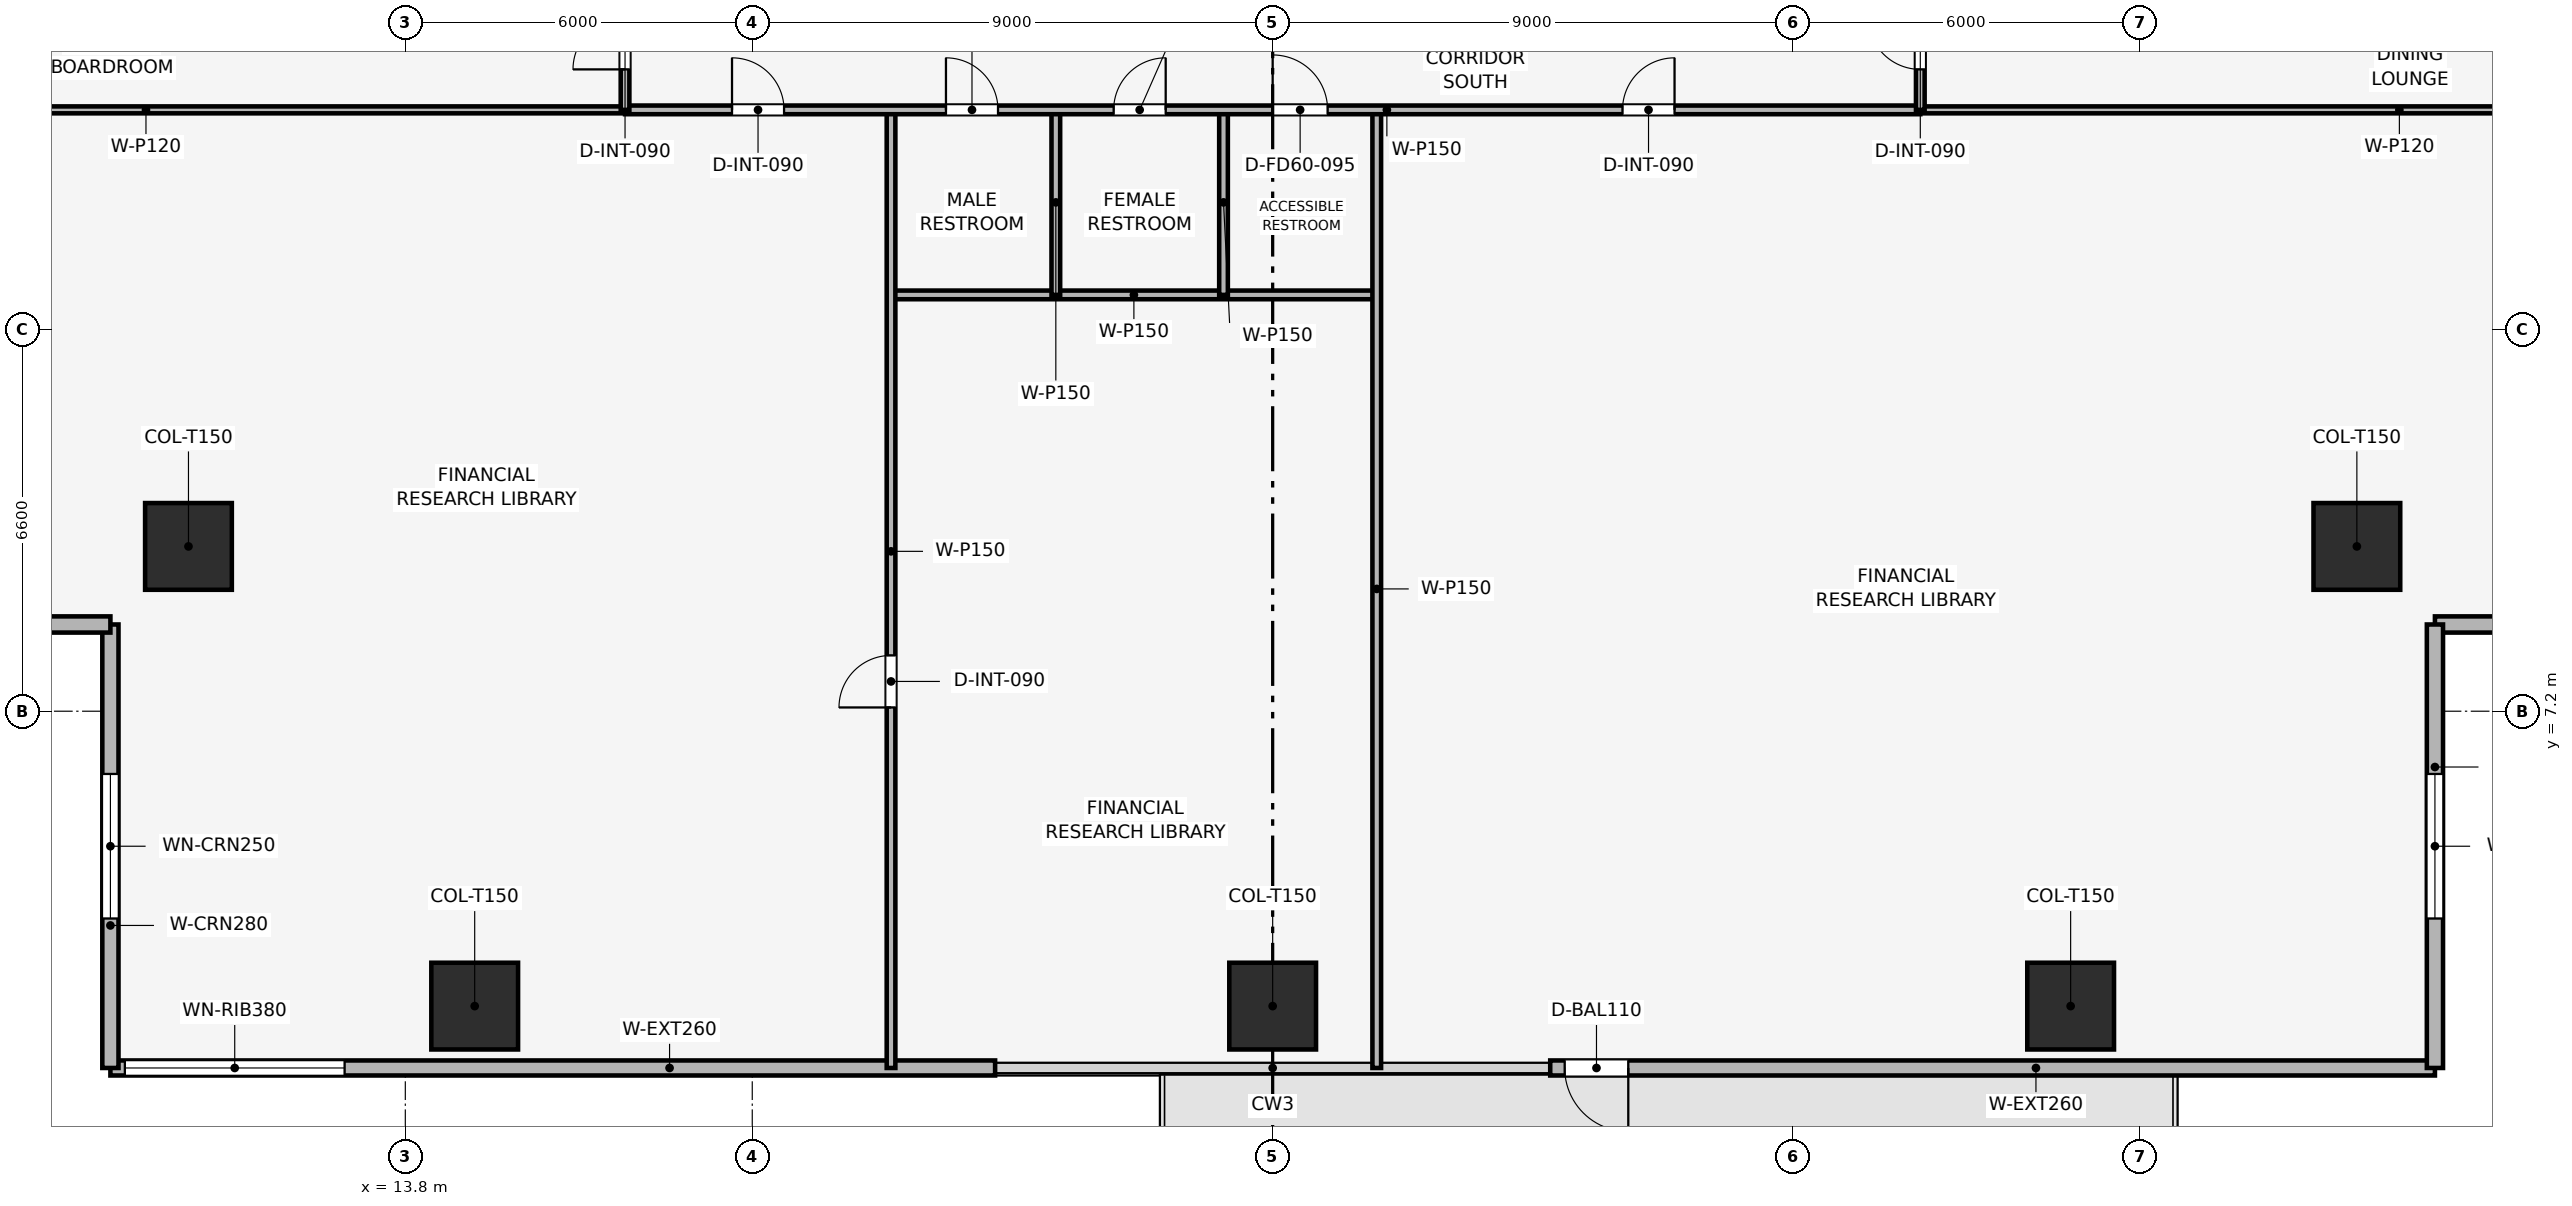
"""IFC4 building model, lengths in metres.
Left out: names, types, materials, properties, quantities, classifications, styles, units other than length and angle.
Written with IfcOpenShell. Run it as: python <this file> out.ifc"""

import sys

from ifc_helpers import new_model, si_unit, direction, frame, frame_2d, origin, origin_2d, place, context, subcontext, project, spatial, rectangle, extrude, element, fill, save


model = new_model("IFC4")
c1 = context("Model", 3, precision=1e-05, world=origin(), true_north=direction((0.0, 1.0)))
c2 = subcontext(c1, "Body", "Model", "MODEL_VIEW")
j1 = project(units=[si_unit("LENGTHUNIT", "METRE"), si_unit("PLANEANGLEUNIT", "RADIAN")], contexts=[c1])
p1 = place(None, origin())
s1 = spatial("IfcSite", under=j1, at=p1, CompositionType="ELEMENT")
p2 = place(p1, origin())
s2 = spatial("IfcBuilding", under=s1, at=p2, CompositionType="ELEMENT")
p3 = place(p2, frame((0.0, 0.0, 92.4)))
s3 = spatial("IfcBuildingStorey", under=s2, at=p3, CompositionType="ELEMENT", Elevation=92.4)
for number, where, z_axis, x_axis in (
    (1, (15.0, 2.1, 0.003), (0.0, 0.0, 1.0), (1.0, 0.0, 0.0)),
    (2, (28.8, 2.1, 0.003), (0.0, 0.0, 1.0), (1.0, 0.0, 0.0)),
    (3, (42.6, 2.1, 0.003), (0.0, 0.0, 1.0), (1.0, 0.0, 0.0)),
    (4, (10.05, 10.05, 0.003), (0.0, 0.0, 1.0), (1.0, 0.0, 0.0)),
    (5, (47.55, 10.05, 0.003), (0.0, 0.0, 1.0), (1.0, 0.0, 0.0)),
):
    element("IfcColumn", number, at=place(p3, frame(where, z_axis=z_axis, x_axis=x_axis)), inside=s3, PredefinedType="COLUMN", context=c2, shape_type="SweptSolid", body=[
        extrude(rectangle(XDim=1.5, YDim=1.5, at=origin_2d()), origin(), (0.0, 0.0, 1.0), 3.644),
    ])
p4 = place(p3, frame((48.9, 1.03, 0.0), z_axis=(0.0, 0.0, 1.0), x_axis=(-1.0, 0.0, 0.0)))
e6 = element("IfcWall", 6, at=p4, inside=s3, PredefinedType="SOLIDWALL", context=c2, shape_type="SweptSolid", body=[
    extrude(rectangle(XDim=15.3, YDim=0.26, at=frame_2d((7.65, 0.0))), origin(), (0.0, 0.0, 1.0), 3.65),
])
p5 = place(p4, frame((13.95, 0.0, 0.0)))
e7 = element("IfcOpeningElement", 7, at=p5, cuts=e6, PredefinedType="OPENING", context=c2, shape_type="SweptSolid", body=[
    extrude(rectangle(XDim=1.1, YDim=2.2, at=frame_2d((0.55, 1.1))), frame((0.0, 0.14, 0.0), z_axis=(0.0, -1.0, 0.0), x_axis=(1.0, 0.0, 0.0)), (0.0, 0.0, 1.0), 0.28),
])
p6 = place(p3, frame((24.0, 1.03, 0.0), z_axis=(0.0, 0.0, 1.0), x_axis=(-1.0, 0.0, 0.0)))
e8 = element("IfcWall", 8, at=p6, inside=s3, PredefinedType="SOLIDWALL", context=c2, shape_type="SweptSolid", body=[
    extrude(rectangle(XDim=15.3, YDim=0.26, at=frame_2d((7.65, 0.0))), origin(), (0.0, 0.0, 1.0), 3.65),
])
p7 = place(p6, frame((11.25, 0.0, 0.9)))
e9 = element("IfcOpeningElement", 9, at=p7, cuts=e8, PredefinedType="OPENING", context=c2, shape_type="SweptSolid", body=[
    extrude(rectangle(XDim=3.8, YDim=1.9, at=frame_2d((1.9, 0.95))), frame((0.0, 0.14, 0.0), z_axis=(0.0, -1.0, 0.0), x_axis=(1.0, 0.0, 0.0)), (0.0, 0.0, 1.0), 0.28),
])
p8 = place(p3, frame((8.7, 1.03, 0.0), z_axis=(0.0, 0.0, 1.0), x_axis=(0.0, 1.0, 0.0)))
e10 = element("IfcWall", 10, at=p8, inside=s3, PredefinedType="SOLIDWALL", context=c2, shape_type="SweptSolid", body=[
    extrude(rectangle(XDim=7.67, YDim=0.28, at=frame_2d((3.835, 0.0))), origin(), (0.0, 0.0, 1.0), 3.65),
])
p9 = place(p8, frame((2.585, 0.0, 0.9)))
e11 = element("IfcOpeningElement", 11, at=p9, cuts=e10, PredefinedType="OPENING", context=c2, shape_type="SweptSolid", body=[
    extrude(rectangle(XDim=2.5, YDim=1.9, at=frame_2d((1.25, 0.95))), frame((0.0, 0.15, 0.0), z_axis=(0.0, -1.0, 0.0), x_axis=(1.0, 0.0, 0.0)), (0.0, 0.0, 1.0), 0.3),
])
p10 = place(p3, frame((8.7, 8.7, 0.0), z_axis=(0.0, 0.0, 1.0), x_axis=(-1.0, 0.0, 0.0)))
e12 = element("IfcWall", 12, at=p10, inside=s3, PredefinedType="SOLIDWALL", context=c2, shape_type="SweptSolid", body=[
    extrude(rectangle(XDim=7.67, YDim=0.28, at=frame_2d((3.835, 0.0))), origin(), (0.0, 0.0, 1.0), 3.65),
])
p11 = place(p10, frame((2.585, 0.0, 0.9)))
e13 = element("IfcOpeningElement", 13, at=p11, cuts=e12, PredefinedType="OPENING", context=c2, shape_type="SweptSolid", body=[
    extrude(rectangle(XDim=2.5, YDim=1.9, at=frame_2d((1.25, 0.95))), frame((0.0, 0.15, 0.0), z_axis=(0.0, -1.0, 0.0), x_axis=(1.0, 0.0, 0.0)), (0.0, 0.0, 1.0), 0.3),
])
p12 = place(p3, frame((56.57, 8.7, 0.0), z_axis=(0.0, 0.0, 1.0), x_axis=(-1.0, 0.0, 0.0)))
e14 = element("IfcWall", 14, at=p12, inside=s3, PredefinedType="SOLIDWALL", context=c2, shape_type="SweptSolid", body=[
    extrude(rectangle(XDim=7.67, YDim=0.28, at=frame_2d((3.835, 0.0))), origin(), (0.0, 0.0, 1.0), 3.65),
])
p13 = place(p12, frame((2.585, 0.0, 0.9)))
e15 = element("IfcOpeningElement", 15, at=p13, cuts=e14, PredefinedType="OPENING", context=c2, shape_type="SweptSolid", body=[
    extrude(rectangle(XDim=2.5, YDim=1.9, at=frame_2d((1.25, 0.95))), frame((0.0, 0.15, 0.0), z_axis=(0.0, -1.0, 0.0), x_axis=(1.0, 0.0, 0.0)), (0.0, 0.0, 1.0), 0.3),
])
p14 = place(p3, frame((48.9, 8.7, 0.0), z_axis=(0.0, 0.0, 1.0), x_axis=(0.0, -1.0, 0.0)))
e16 = element("IfcWall", 16, at=p14, inside=s3, PredefinedType="SOLIDWALL", context=c2, shape_type="SweptSolid", body=[
    extrude(rectangle(XDim=7.67, YDim=0.28, at=frame_2d((3.835, 0.0))), origin(), (0.0, 0.0, 1.0), 3.65),
])
p15 = place(p14, frame((2.585, 0.0, 0.9)))
e17 = element("IfcOpeningElement", 17, at=p15, cuts=e16, PredefinedType="OPENING", context=c2, shape_type="SweptSolid", body=[
    extrude(rectangle(XDim=2.5, YDim=1.9, at=frame_2d((1.25, 0.95))), frame((0.0, 0.15, 0.0), z_axis=(0.0, -1.0, 0.0), x_axis=(1.0, 0.0, 0.0)), (0.0, 0.0, 1.0), 0.3),
])
p16 = place(p3, frame((22.2, 14.4, 0.0), z_axis=(0.0, 0.0, 1.0), x_axis=(1.0, 0.0, 0.0)))
e18 = element("IfcWall", 18, at=p16, inside=s3, PredefinedType="PARTITIONING", context=c2, shape_type="SweptSolid", body=[
    extrude(rectangle(XDim=8.4, YDim=0.15, at=frame_2d((4.2, 0.0))), origin(), (0.0, 0.0, 1.0), 3.085),
])
p17 = place(p3, frame((22.2, 1.03, 0.0), z_axis=(0.0, 0.0, 1.0), x_axis=(0.0, 1.0, 0.0)))
e19 = element("IfcWall", 19, at=p17, inside=s3, PredefinedType="PARTITIONING", context=c2, shape_type="SweptSolid", body=[
    extrude(rectangle(XDim=16.57, YDim=0.15, at=frame_2d((8.285, 0.0))), origin(), (0.0, 0.0, 1.0), 2.935),
])
p18 = place(p17, frame((6.235, 0.0, 0.0)))
e20 = element("IfcOpeningElement", 20, at=p18, cuts=e19, PredefinedType="OPENING", context=c2, shape_type="SweptSolid", body=[
    extrude(rectangle(XDim=0.9, YDim=2.1, at=frame_2d((0.45, 1.05))), frame((0.0, 0.085, 0.0), z_axis=(0.0, -1.0, 0.0), x_axis=(1.0, 0.0, 0.0)), (0.0, 0.0, 1.0), 0.17),
])
p19 = place(p3, frame((30.6, 1.03, 0.0), z_axis=(0.0, 0.0, 1.0), x_axis=(0.0, 1.0, 0.0)))
e21 = element("IfcWall", 21, at=p19, inside=s3, PredefinedType="PARTITIONING", context=c2, shape_type="SweptSolid", body=[
    extrude(rectangle(XDim=16.57, YDim=0.15, at=frame_2d((8.285, 0.0))), origin(), (0.0, 0.0, 1.0), 2.935),
])
for number, where, z_axis, x_axis in (
    (22, (25.05, 14.4, 0.0), (0.0, 0.0, 1.0), (0.0, 1.0, 0.0)),
    (23, (27.95, 14.4, 0.0), (0.0, 0.0, 1.0), (0.0, 1.0, 0.0)),
):
    element("IfcWall", number, at=place(p3, frame(where, z_axis=z_axis, x_axis=x_axis)), inside=s3, PredefinedType="PARTITIONING", context=c2, shape_type="SweptSolid", body=[
        extrude(rectangle(XDim=3.2, YDim=0.15, at=frame_2d((1.6, 0.0))), origin(), (0.0, 0.0, 1.0), 3.65),
    ])
for number, where, z_axis, x_axis in (
    (24, (1.03, 17.6, 0.0), (0.0, 0.0, 1.0), (1.0, 0.0, 0.0)),
    (25, (40.0, 17.6, 0.0), (0.0, 0.0, 1.0), (1.0, 0.0, 0.0)),
):
    element("IfcWall", number, at=place(p3, frame(where, z_axis=z_axis, x_axis=x_axis)), inside=s3, PredefinedType="PARTITIONING", context=c2, shape_type="SweptSolid", body=[
        extrude(rectangle(XDim=16.57, YDim=0.12, at=frame_2d((8.285, 0.0))), origin(), (0.0, 0.0, 1.0), 2.935),
    ])
p20 = place(p3, frame((17.6, 17.6, 0.0), z_axis=(0.0, 0.0, 1.0), x_axis=(1.0, 0.0, 0.0)))
e26 = element("IfcWall", 26, at=p20, inside=s3, PredefinedType="PARTITIONING", context=c2, shape_type="SweptSolid", body=[
    extrude(rectangle(XDim=22.4, YDim=0.15, at=frame_2d((11.2, 0.0))), origin(), (0.0, 0.0, 1.0), 3.085),
])
p21 = place(p20, frame((1.85, 0.0, 0.0)))
e27 = element("IfcOpeningElement", 27, at=p21, cuts=e26, PredefinedType="OPENING", context=c2, shape_type="SweptSolid", body=[
    extrude(rectangle(XDim=0.9, YDim=2.1, at=frame_2d((0.45, 1.05))), frame((0.0, 0.085, 0.0), z_axis=(0.0, -1.0, 0.0), x_axis=(1.0, 0.0, 0.0)), (0.0, 0.0, 1.0), 0.17),
])
p22 = place(p20, frame((5.55, 0.0, 0.0)))
e28 = element("IfcOpeningElement", 28, at=p22, cuts=e26, PredefinedType="OPENING", context=c2, shape_type="SweptSolid", body=[
    extrude(rectangle(XDim=0.9, YDim=2.1, at=frame_2d((0.45, 1.05))), frame((0.0, 0.085, 0.0), z_axis=(0.0, -1.0, 0.0), x_axis=(1.0, 0.0, 0.0)), (0.0, 0.0, 1.0), 0.17),
])
p23 = place(p20, frame((8.45, 0.0, 0.0)))
e29 = element("IfcOpeningElement", 29, at=p23, cuts=e26, PredefinedType="OPENING", context=c2, shape_type="SweptSolid", body=[
    extrude(rectangle(XDim=0.9, YDim=2.1, at=frame_2d((0.45, 1.05))), frame((0.0, 0.085, 0.0), z_axis=(0.0, -1.0, 0.0), x_axis=(1.0, 0.0, 0.0)), (0.0, 0.0, 1.0), 0.17),
])
p24 = place(p20, frame((11.2, 0.0, 0.0)))
e30 = element("IfcOpeningElement", 30, at=p24, cuts=e26, PredefinedType="OPENING", context=c2, shape_type="SweptSolid", body=[
    extrude(rectangle(XDim=0.95, YDim=2.1, at=frame_2d((0.475, 1.05))), frame((0.0, 0.085, 0.0), z_axis=(0.0, -1.0, 0.0), x_axis=(1.0, 0.0, 0.0)), (0.0, 0.0, 1.0), 0.17),
])
p25 = place(p20, frame((17.25, 0.0, 0.0)))
e31 = element("IfcOpeningElement", 31, at=p25, cuts=e26, PredefinedType="OPENING", context=c2, shape_type="SweptSolid", body=[
    extrude(rectangle(XDim=0.9, YDim=2.1, at=frame_2d((0.45, 1.05))), frame((0.0, 0.085, 0.0), z_axis=(0.0, -1.0, 0.0), x_axis=(1.0, 0.0, 0.0)), (0.0, 0.0, 1.0), 0.17),
])
p26 = place(p3, frame((17.6, 17.6, 0.0), z_axis=(0.0, 0.0, 1.0), x_axis=(0.0, 1.0, 0.0)))
e32 = element("IfcWall", 32, at=p26, inside=s3, PredefinedType="PARTITIONING", context=c2, shape_type="SweptSolid", body=[
    extrude(rectangle(XDim=22.4, YDim=0.15, at=frame_2d((11.2, 0.0))), origin(), (0.0, 0.0, 1.0), 3.085),
])
p27 = place(p26, frame((0.7, 0.0, 0.0)))
e33 = element("IfcOpeningElement", 33, at=p27, cuts=e32, PredefinedType="OPENING", context=c2, shape_type="SweptSolid", body=[
    extrude(rectangle(XDim=0.9, YDim=2.1, at=frame_2d((0.45, 1.05))), frame((0.0, 0.085, 0.0), z_axis=(0.0, -1.0, 0.0), x_axis=(1.0, 0.0, 0.0)), (0.0, 0.0, 1.0), 0.17),
])
p28 = place(p26, frame((6.365, 0.0, 0.0)))
e34 = element("IfcOpeningElement", 34, at=p28, cuts=e32, PredefinedType="OPENING", context=c2, shape_type="SweptSolid", body=[
    extrude(rectangle(XDim=0.9, YDim=2.1, at=frame_2d((0.45, 1.05))), frame((0.0, 0.085, 0.0), z_axis=(0.0, -1.0, 0.0), x_axis=(1.0, 0.0, 0.0)), (0.0, 0.0, 1.0), 0.17),
])
p29 = place(p26, frame((16.415, 0.0, 0.0)))
e35 = element("IfcOpeningElement", 35, at=p29, cuts=e32, PredefinedType="OPENING", context=c2, shape_type="SweptSolid", body=[
    extrude(rectangle(XDim=0.9, YDim=2.1, at=frame_2d((0.45, 1.05))), frame((0.0, 0.085, 0.0), z_axis=(0.0, -1.0, 0.0), x_axis=(1.0, 0.0, 0.0)), (0.0, 0.0, 1.0), 0.17),
])
p30 = place(p3, frame((40.0, 17.6, 0.0), z_axis=(0.0, 0.0, 1.0), x_axis=(0.0, 1.0, 0.0)))
e36 = element("IfcWall", 36, at=p30, inside=s3, PredefinedType="PARTITIONING", context=c2, shape_type="SweptSolid", body=[
    extrude(rectangle(XDim=22.4, YDim=0.15, at=frame_2d((11.2, 0.0))), origin(), (0.0, 0.0, 1.0), 3.085),
])
p31 = place(p30, frame((0.7, 0.0, 0.0)))
e37 = element("IfcOpeningElement", 37, at=p31, cuts=e36, PredefinedType="OPENING", context=c2, shape_type="SweptSolid", body=[
    extrude(rectangle(XDim=0.9, YDim=2.1, at=frame_2d((0.45, 1.05))), frame((0.0, 0.085, 0.0), z_axis=(0.0, -1.0, 0.0), x_axis=(1.0, 0.0, 0.0)), (0.0, 0.0, 1.0), 0.17),
])
p32 = place(p30, frame((4.699, 0.0, 0.0)))
e38 = element("IfcOpeningElement", 38, at=p32, cuts=e36, PredefinedType="OPENING", context=c2, shape_type="SweptSolid", body=[
    extrude(rectangle(XDim=0.9, YDim=2.1, at=frame_2d((0.45, 1.05))), frame((0.0, 0.085, 0.0), z_axis=(0.0, -1.0, 0.0), x_axis=(1.0, 0.0, 0.0)), (0.0, 0.0, 1.0), 0.17),
])
p33 = place(p30, frame((10.692, 0.0, 0.0)))
e39 = element("IfcOpeningElement", 39, at=p33, cuts=e36, PredefinedType="OPENING", context=c2, shape_type="SweptSolid", body=[
    extrude(rectangle(XDim=0.9, YDim=2.1, at=frame_2d((0.45, 1.05))), frame((0.0, 0.085, 0.0), z_axis=(0.0, -1.0, 0.0), x_axis=(1.0, 0.0, 0.0)), (0.0, 0.0, 1.0), 0.17),
])
p34 = place(p30, frame((17.892, 0.0, 0.0)))
e40 = element("IfcOpeningElement", 40, at=p34, cuts=e36, PredefinedType="OPENING", context=c2, shape_type="SweptSolid", body=[
    extrude(rectangle(XDim=0.9, YDim=2.1, at=frame_2d((0.45, 1.05))), frame((0.0, 0.085, 0.0), z_axis=(0.0, -1.0, 0.0), x_axis=(1.0, 0.0, 0.0)), (0.0, 0.0, 1.0), 0.17),
])
p35 = place(p5, origin())
e41 = element("IfcDoor", 41, at=p35, inside=s3, OperationType="SINGLE_SWING_LEFT", PredefinedType="DOOR", context=c2, shape_type="SweptSolid", body=[
    extrude(rectangle(XDim=1.1, YDim=2.2, at=frame_2d((0.55, 1.1))), frame((0.0, 0.025, 0.0), z_axis=(0.0, -1.0, 0.0), x_axis=(1.0, 0.0, 0.0)), (0.0, 0.0, 1.0), 0.05),
])
fill(e7, e41)
p36 = place(p7, origin())
e42 = element("IfcWindow", 42, at=p36, inside=s3, PartitioningType="SINGLE_PANEL", PredefinedType="WINDOW", context=c2, shape_type="SweptSolid", body=[
    extrude(rectangle(XDim=3.8, YDim=1.9, at=frame_2d((1.9, 0.95))), frame((0.0, 0.03, 0.0), z_axis=(0.0, -1.0, 0.0), x_axis=(1.0, 0.0, 0.0)), (0.0, 0.0, 1.0), 0.06),
])
fill(e9, e42)
p37 = place(p9, origin())
e43 = element("IfcWindow", 43, at=p37, inside=s3, PartitioningType="SINGLE_PANEL", PredefinedType="WINDOW", context=c2, shape_type="SweptSolid", body=[
    extrude(rectangle(XDim=2.5, YDim=1.9, at=frame_2d((1.25, 0.95))), frame((0.0, 0.03, 0.0), z_axis=(0.0, -1.0, 0.0), x_axis=(1.0, 0.0, 0.0)), (0.0, 0.0, 1.0), 0.06),
])
fill(e11, e43)
p38 = place(p15, origin())
e44 = element("IfcWindow", 44, at=p38, inside=s3, PartitioningType="SINGLE_PANEL", PredefinedType="WINDOW", context=c2, shape_type="SweptSolid", body=[
    extrude(rectangle(XDim=2.5, YDim=1.9, at=frame_2d((1.25, 0.95))), frame((0.0, 0.03, 0.0), z_axis=(0.0, -1.0, 0.0), x_axis=(1.0, 0.0, 0.0)), (0.0, 0.0, 1.0), 0.06),
])
fill(e17, e44)
p39 = place(p18, origin())
e45 = element("IfcDoor", 45, at=p39, inside=s3, OperationType="SINGLE_SWING_LEFT", PredefinedType="DOOR", context=c2, shape_type="SweptSolid", body=[
    extrude(rectangle(XDim=0.9, YDim=2.1, at=frame_2d((0.45, 1.05))), frame((0.0, 0.025, 0.0), z_axis=(0.0, -1.0, 0.0), x_axis=(1.0, 0.0, 0.0)), (0.0, 0.0, 1.0), 0.05),
])
fill(e20, e45)
p40 = place(p21, origin())
e46 = element("IfcDoor", 46, at=p40, inside=s3, OperationType="SINGLE_SWING_LEFT", PredefinedType="DOOR", context=c2, shape_type="SweptSolid", body=[
    extrude(rectangle(XDim=0.9, YDim=2.1, at=frame_2d((0.45, 1.05))), frame((0.0, 0.025, 0.0), z_axis=(0.0, -1.0, 0.0), x_axis=(1.0, 0.0, 0.0)), (0.0, 0.0, 1.0), 0.05),
])
fill(e27, e46)
p41 = place(p22, origin())
e47 = element("IfcDoor", 47, at=p41, inside=s3, OperationType="SINGLE_SWING_LEFT", PredefinedType="DOOR", context=c2, shape_type="SweptSolid", body=[
    extrude(rectangle(XDim=0.9, YDim=2.1, at=frame_2d((0.45, 1.05))), frame((0.0, 0.025, 0.0), z_axis=(0.0, -1.0, 0.0), x_axis=(1.0, 0.0, 0.0)), (0.0, 0.0, 1.0), 0.05),
])
fill(e28, e47)
p42 = place(p23, origin())
e48 = element("IfcDoor", 48, at=p42, inside=s3, OperationType="SINGLE_SWING_RIGHT", PredefinedType="DOOR", context=c2, shape_type="SweptSolid", body=[
    extrude(rectangle(XDim=0.9, YDim=2.1, at=frame_2d((0.45, 1.05))), frame((0.0, 0.025, 0.0), z_axis=(0.0, -1.0, 0.0), x_axis=(1.0, 0.0, 0.0)), (0.0, 0.0, 1.0), 0.05),
])
fill(e29, e48)
p43 = place(p24, origin())
e49 = element("IfcDoor", 49, at=p43, inside=s3, OperationType="SINGLE_SWING_LEFT", PredefinedType="DOOR", context=c2, shape_type="SweptSolid", body=[
    extrude(rectangle(XDim=0.95, YDim=2.1, at=frame_2d((0.475, 1.05))), frame((0.0, 0.025, 0.0), z_axis=(0.0, -1.0, 0.0), x_axis=(1.0, 0.0, 0.0)), (0.0, 0.0, 1.0), 0.05),
])
fill(e30, e49)
p44 = place(p25, origin())
e50 = element("IfcDoor", 50, at=p44, inside=s3, OperationType="SINGLE_SWING_RIGHT", PredefinedType="DOOR", context=c2, shape_type="SweptSolid", body=[
    extrude(rectangle(XDim=0.9, YDim=2.1, at=frame_2d((0.45, 1.05))), frame((0.0, 0.025, 0.0), z_axis=(0.0, -1.0, 0.0), x_axis=(1.0, 0.0, 0.0)), (0.0, 0.0, 1.0), 0.05),
])
fill(e31, e50)
p45 = place(p27, origin())
e51 = element("IfcDoor", 51, at=p45, inside=s3, OperationType="SINGLE_SWING_LEFT", PredefinedType="DOOR", context=c2, shape_type="SweptSolid", body=[
    extrude(rectangle(XDim=0.9, YDim=2.1, at=frame_2d((0.45, 1.05))), frame((0.0, 0.025, 0.0), z_axis=(0.0, -1.0, 0.0), x_axis=(1.0, 0.0, 0.0)), (0.0, 0.0, 1.0), 0.05),
])
fill(e33, e51)
p46 = place(p31, origin())
e52 = element("IfcDoor", 52, at=p46, inside=s3, OperationType="SINGLE_SWING_RIGHT", PredefinedType="DOOR", context=c2, shape_type="SweptSolid", body=[
    extrude(rectangle(XDim=0.9, YDim=2.1, at=frame_2d((0.45, 1.05))), frame((0.0, 0.025, 0.0), z_axis=(0.0, -1.0, 0.0), x_axis=(1.0, 0.0, 0.0)), (0.0, 0.0, 1.0), 0.05),
])
fill(e37, e52)
save(model, sys.argv[1])
